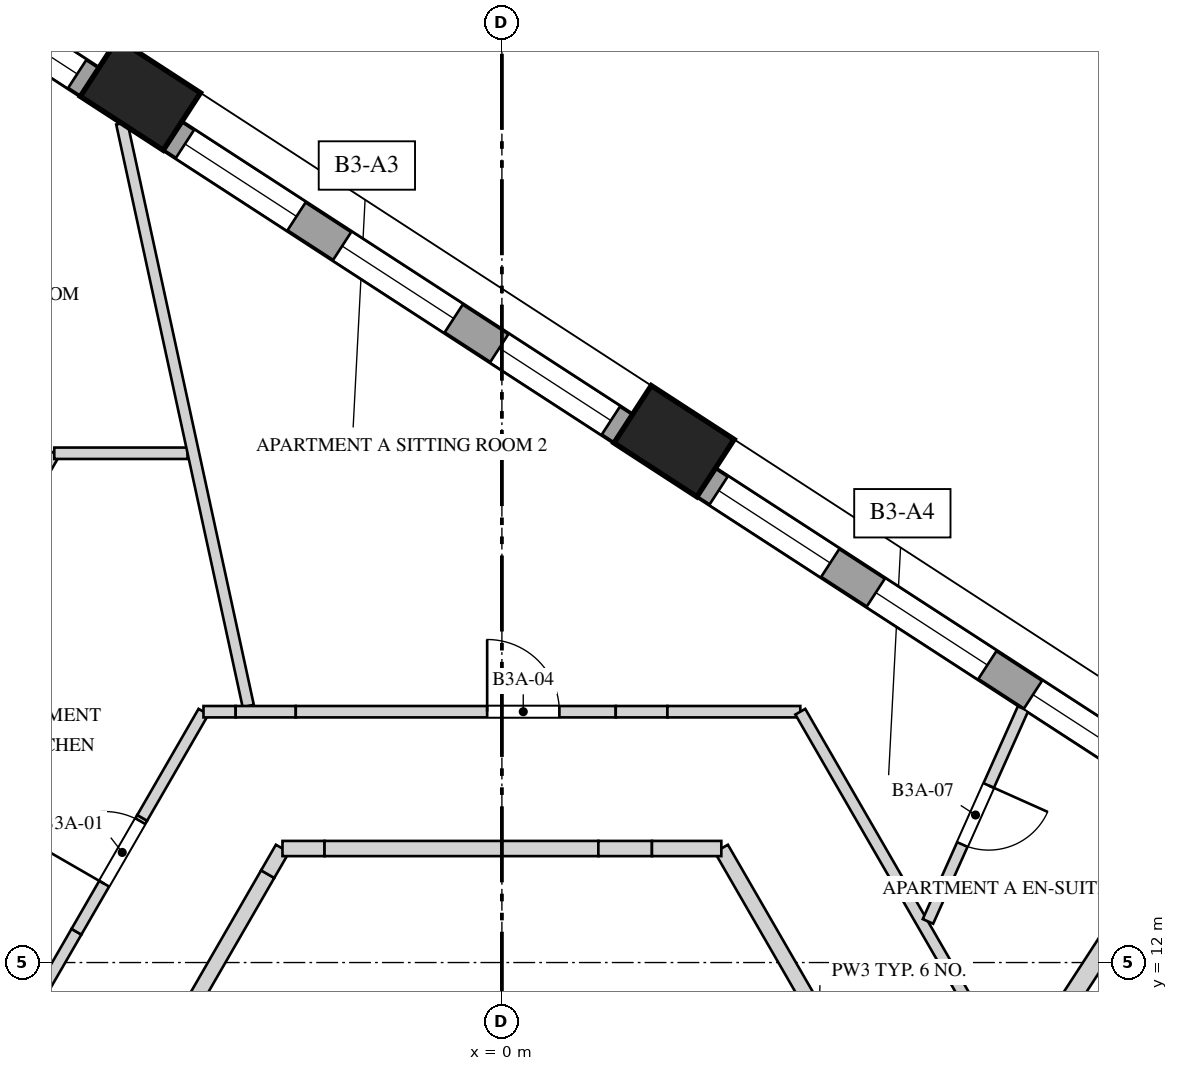
"""IFC4 building model, lengths in metres.
Left out: names, types, materials, properties, quantities, classifications, styles, units other than length and angle.
Written with IfcOpenShell. Run it as: python <this file> out.ifc"""

import sys

from ifc_helpers import new_model, si_unit, direction, frame, frame_2d, origin, origin_2d, place, context, subcontext, project, spatial, polyline, rectangle, outline, extrude, element, fill, save


model = new_model("IFC4")
c1 = context("Model", 3, precision=1e-05, world=origin(), true_north=direction((0.0, 1.0)))
c2 = subcontext(c1, "Body", "Model", "MODEL_VIEW")
j1 = project(units=[si_unit("LENGTHUNIT", "METRE"), si_unit("PLANEANGLEUNIT", "RADIAN")], contexts=[c1])
p1 = place(None, origin())
s1 = spatial("IfcSite", under=j1, at=p1, CompositionType="ELEMENT")
p2 = place(p1, origin())
s2 = spatial("IfcBuilding", under=s1, at=p2, CompositionType="ELEMENT")
p3 = place(p2, frame((0.0, 0.0, 133.6)))
s3 = spatial("IfcBuildingStorey", under=s2, at=p3, CompositionType="ELEMENT", Elevation=133.6)
for number, where, z_axis, x_axis in (
    (1, (2.265, 18.859, 0.0), (0.0, 0.0, 1.0), (-0.839, 0.545, 0.0)),
    (2, (-4.756, 23.418, 0.0), (0.0, 0.0, 1.0), (-0.839, 0.545, 0.0)),
):
    element("IfcColumn", number, at=place(p3, frame(where, z_axis=z_axis, x_axis=x_axis)), inside=s3, PredefinedType="COLUMN", context=c2, shape_type="SweptSolid", body=[
        extrude(rectangle(XDim=1.3, YDim=0.9, at=origin_2d()), origin(), (0.0, 0.0, 1.0), 4.0),
    ])
p4 = place(p3, frame((8.618, 14.465, 0.0), z_axis=(0.0, 0.0, 1.0), x_axis=(-0.838661251934, 0.544653380146, 0.0)))
e3 = element("IfcWall", 3, at=p4, inside=s3, PredefinedType="SOLIDWALL", context=c2, shape_type="SweptSolid", body=[
    extrude(rectangle(XDim=7.072, YDim=0.45, at=frame_2d((3.536, 0.0))), origin(), (0.0, 0.0, 1.0), 3.3),
])
p5 = place(p4, frame((0.195, 0.0, 0.5)))
e4 = element("IfcOpeningElement", 4, at=p5, cuts=e3, PredefinedType="OPENING", context=c2, shape_type="SweptSolid", body=[
    extrude(rectangle(XDim=1.75, YDim=2.65, at=frame_2d((0.875, 1.325))), frame((0.0, 0.235, 0.0), z_axis=(0.0, -1.0, 0.0), x_axis=(1.0, 0.0, 0.0)), (0.0, 0.0, 1.0), 0.47),
])
p6 = place(p4, frame((2.661, 0.0, 0.5)))
e5 = element("IfcOpeningElement", 5, at=p6, cuts=e3, PredefinedType="OPENING", context=c2, shape_type="SweptSolid", body=[
    extrude(rectangle(XDim=1.75, YDim=2.65, at=frame_2d((0.875, 1.325))), frame((0.0, 0.235, 0.0), z_axis=(0.0, -1.0, 0.0), x_axis=(1.0, 0.0, 0.0)), (0.0, 0.0, 1.0), 0.47),
])
p7 = place(p4, frame((5.126, 0.0, 0.5)))
e6 = element("IfcOpeningElement", 6, at=p7, cuts=e3, PredefinedType="OPENING", context=c2, shape_type="SweptSolid", body=[
    extrude(rectangle(XDim=1.75, YDim=2.65, at=frame_2d((0.875, 1.325))), frame((0.0, 0.235, 0.0), z_axis=(0.0, -1.0, 0.0), x_axis=(1.0, 0.0, 0.0)), (0.0, 0.0, 1.0), 0.47),
])
p8 = place(p3, frame((1.597, 19.024, 0.0), z_axis=(0.0, 0.0, 1.0), x_axis=(-0.838677021821, 0.54462909679, 0.0)))
e7 = element("IfcWall", 7, at=p8, inside=s3, PredefinedType="SOLIDWALL", context=c2, shape_type="SweptSolid", body=[
    extrude(rectangle(XDim=7.072, YDim=0.45, at=frame_2d((3.536, 0.0))), origin(), (0.0, 0.0, 1.0), 3.3),
])
p9 = place(p8, frame((0.195, 0.0, 0.5)))
e8 = element("IfcOpeningElement", 8, at=p9, cuts=e7, PredefinedType="OPENING", context=c2, shape_type="SweptSolid", body=[
    extrude(rectangle(XDim=1.75, YDim=2.65, at=frame_2d((0.875, 1.325))), frame((0.0, 0.235, 0.0), z_axis=(0.0, -1.0, 0.0), x_axis=(1.0, 0.0, 0.0)), (0.0, 0.0, 1.0), 0.47),
])
p10 = place(p8, frame((2.661, 0.0, 0.5)))
e9 = element("IfcOpeningElement", 9, at=p10, cuts=e7, PredefinedType="OPENING", context=c2, shape_type="SweptSolid", body=[
    extrude(rectangle(XDim=1.75, YDim=2.65, at=frame_2d((0.875, 1.325))), frame((0.0, 0.235, 0.0), z_axis=(0.0, -1.0, 0.0), x_axis=(1.0, 0.0, 0.0)), (0.0, 0.0, 1.0), 0.47),
])
p11 = place(p8, frame((5.126, 0.0, 0.5)))
e10 = element("IfcOpeningElement", 10, at=p11, cuts=e7, PredefinedType="OPENING", context=c2, shape_type="SweptSolid", body=[
    extrude(rectangle(XDim=1.75, YDim=2.0, at=frame_2d((0.875, 1.0))), frame((0.0, 0.235, 0.0), z_axis=(0.0, -1.0, 0.0), x_axis=(1.0, 0.0, 0.0)), (0.0, 0.0, 1.0), 0.47),
])
p12 = place(p3, frame((-5.424, 23.584, 0.0), z_axis=(0.0, 0.0, 1.0), x_axis=(-0.838675466927, 0.544631491171, 0.0)))
e11 = element("IfcWall", 11, at=p12, inside=s3, PredefinedType="SOLIDWALL", context=c2, shape_type="SweptSolid", body=[
    extrude(rectangle(XDim=6.421, YDim=0.45, at=frame_2d((3.211, 0.0))), origin(), (0.0, 0.0, 1.0), 3.3),
])
p13 = place(p12, frame((0.195, 0.0, 0.5)))
e12 = element("IfcOpeningElement", 12, at=p13, cuts=e11, PredefinedType="OPENING", context=c2, shape_type="SweptSolid", body=[
    extrude(rectangle(XDim=1.75, YDim=2.65, at=frame_2d((0.875, 1.325))), frame((0.0, 0.235, 0.0), z_axis=(0.0, -1.0, 0.0), x_axis=(1.0, 0.0, 0.0)), (0.0, 0.0, 1.0), 0.47),
])
p14 = place(p12, frame((2.661, 0.0, 0.5)))
e13 = element("IfcOpeningElement", 13, at=p14, cuts=e11, PredefinedType="OPENING", context=c2, shape_type="SweptSolid", body=[
    extrude(rectangle(XDim=1.75, YDim=2.65, at=frame_2d((0.875, 1.325))), frame((0.0, 0.235, 0.0), z_axis=(0.0, -1.0, 0.0), x_axis=(1.0, 0.0, 0.0)), (0.0, 0.0, 1.0), 0.47),
])
p15 = place(p12, frame((5.126, 0.0, 0.5)))
e14 = element("IfcOpeningElement", 14, at=p15, cuts=e11, PredefinedType="OPENING", context=c2, shape_type="SweptSolid", body=[
    extrude(rectangle(XDim=1.1, YDim=2.0, at=frame_2d((0.55, 1.0))), frame((0.0, 0.235, 0.0), z_axis=(0.0, -1.0, 0.0), x_axis=(1.0, 0.0, 0.0)), (0.0, 0.0, 1.0), 0.47),
])
p16 = place(p3, frame((-6.683, 17.325, 0.0), z_axis=(0.0, 0.0, 1.0), x_axis=(0.500108487576, 0.865962759392, 0.0)))
e15 = element("IfcWall", 15, at=p16, inside=s3, PredefinedType="PARTITIONING", context=c2, shape_type="SweptSolid", body=[
    extrude(rectangle(XDim=1.588, YDim=0.15, at=frame_2d((0.794, 0.0))), origin(), (0.0, 0.0, 1.0), 3.65),
])
p17 = place(p3, frame((-6.064, 11.597, 0.0), z_axis=(0.0, 0.0, 1.0), x_axis=(0.499797962495, 0.866142018774, 0.0)))
e16 = element("IfcWall", 16, at=p17, inside=s3, PredefinedType="PARTITIONING", context=c2, shape_type="SweptSolid", body=[
    extrude(rectangle(XDim=0.933, YDim=0.15, at=frame_2d((0.467, 0.0))), origin(), (0.0, 0.0, 1.0), 3.65),
])
p18 = place(p3, frame((-5.597, 12.405, 0.0), z_axis=(0.0, 0.0, 1.0), x_axis=(0.500040090343, 0.866002256377, 0.0)))
e17 = element("IfcWall", 17, at=p18, inside=s3, PredefinedType="PARTITIONING", context=c2, shape_type="SweptSolid", body=[
    extrude(outline(polyline([(0.0, 0.0), (1.73, 0.0), (1.73, 3.65), (1.104, 3.65), (1.104, 2.55), (0.0, 2.55), (0.0, 0.0)])), frame((0.0, 0.075, 0.0), z_axis=(0.0, -1.0, 0.0), x_axis=(1.0, 0.0, 0.0)), (0.0, 0.0, 1.0), 0.15),
])
p19 = place(p18, frame((0.73, 0.0, 0.0)))
e18 = element("IfcOpeningElement", 18, at=p19, cuts=e17, PredefinedType="OPENING", context=c2, shape_type="SweptSolid", body=[
    extrude(rectangle(XDim=0.95, YDim=2.4, at=frame_2d((0.475, 1.2))), frame((0.0, 0.085, 0.0), z_axis=(0.0, -1.0, 0.0), x_axis=(1.0, 0.0, 0.0)), (0.0, 0.0, 1.0), 0.17),
])
p20 = place(p3, frame((-4.732, 13.903, 0.0), z_axis=(0.0, 0.0, 1.0), x_axis=(0.499997628298, 0.866026773083, 0.0)))
e19 = element("IfcWall", 19, at=p20, inside=s3, PredefinedType="PARTITIONING", context=c2, shape_type="SweptSolid", body=[
    extrude(rectangle(XDim=1.613, YDim=0.15, at=frame_2d((0.806, 0.0))), origin(), (0.0, 0.0, 1.0), 3.65),
])
p21 = place(p3, frame((-5.889, 18.7, 0.0), z_axis=(0.0, 0.0, 1.0), x_axis=(1.0, 0.0, 0.0)))
e20 = element("IfcWall", 20, at=p21, inside=s3, PredefinedType="PARTITIONING", context=c2, shape_type="SweptSolid", body=[
    extrude(rectangle(XDim=1.753, YDim=0.15, at=frame_2d((0.877, 0.0))), origin(), (0.0, 0.0, 1.0), 3.65),
])
p22 = place(p3, frame((-5.001, 23.041, 0.0), z_axis=(0.0, 0.0, 1.0), x_axis=(0.212100148987, -0.977247935173, 0.0)))
e21 = element("IfcWall", 21, at=p22, inside=s3, PredefinedType="PARTITIONING", context=c2, shape_type="SweptSolid", body=[
    extrude(rectangle(XDim=7.844, YDim=0.15, at=frame_2d((3.922, 0.0))), origin(), (0.0, 0.0, 1.0), 2.75),
])
p23 = place(p3, frame((-3.926, 15.3, 0.0), z_axis=(0.0, 0.0, 1.0), x_axis=(1.0, 0.0, 0.0)))
e22 = element("IfcWall", 22, at=p23, inside=s3, PredefinedType="PARTITIONING", context=c2, shape_type="SweptSolid", body=[
    extrude(rectangle(XDim=0.423, YDim=0.15, at=frame_2d((0.212, 0.0))), origin(), (0.0, 0.0, 1.0), 3.65),
])
p24 = place(p3, frame((-3.503, 15.3, 0.0), z_axis=(0.0, 0.0, 1.0), x_axis=(1.0, 0.0, 0.0)))
e23 = element("IfcWall", 23, at=p24, inside=s3, PredefinedType="PARTITIONING", context=c2, shape_type="SweptSolid", body=[
    extrude(rectangle(XDim=0.791, YDim=0.15, at=frame_2d((0.396, 0.0))), origin(), (0.0, 0.0, 1.0), 2.75),
])
p25 = place(p3, frame((-2.712, 15.3, 0.0), z_axis=(0.0, 0.0, 1.0), x_axis=(1.0, 0.0, 0.0)))
e24 = element("IfcWall", 24, at=p25, inside=s3, PredefinedType="PARTITIONING", context=c2, shape_type="SweptSolid", body=[
    extrude(rectangle(XDim=4.209, YDim=0.15, at=frame_2d((2.105, 0.0))), origin(), (0.0, 0.0, 1.0), 3.65),
])
p26 = place(p25, frame((2.518, 0.0, 0.0)))
e25 = element("IfcOpeningElement", 25, at=p26, cuts=e24, PredefinedType="OPENING", context=c2, shape_type="SweptSolid", body=[
    extrude(rectangle(XDim=0.95, YDim=2.4, at=frame_2d((0.475, 1.2))), frame((0.0, 0.085, 0.0), z_axis=(0.0, -1.0, 0.0), x_axis=(1.0, 0.0, 0.0)), (0.0, 0.0, 1.0), 0.17),
])
p27 = place(p3, frame((1.498, 15.3, 0.0), z_axis=(0.0, 0.0, 1.0), x_axis=(1.0, 0.0, 0.0)))
e26 = element("IfcWall", 26, at=p27, inside=s3, PredefinedType="PARTITIONING", context=c2, shape_type="SweptSolid", body=[
    extrude(rectangle(XDim=0.68, YDim=0.15, at=frame_2d((0.34, 0.0))), origin(), (0.0, 0.0, 1.0), 2.95),
])
p28 = place(p3, frame((2.177, 15.3, 0.0), z_axis=(0.0, 0.0, 1.0), x_axis=(1.0, 0.0, 0.0)))
e27 = element("IfcWall", 27, at=p28, inside=s3, PredefinedType="PARTITIONING", context=c2, shape_type="SweptSolid", body=[
    extrude(rectangle(XDim=1.749, YDim=0.15, at=frame_2d((0.874, 0.0))), origin(), (0.0, 0.0, 1.0), 3.65),
])
p29 = place(p3, frame((3.926, 15.3, 0.0), z_axis=(0.0, 0.0, 1.0), x_axis=(0.499974706519, -0.86604000649, 0.0)))
e28 = element("IfcWall", 28, at=p29, inside=s3, PredefinedType="PARTITIONING", context=c2, shape_type="SweptSolid", body=[
    extrude(rectangle(XDim=5.278, YDim=0.15, at=frame_2d((2.639, 0.0))), origin(), (0.0, 0.0, 1.0), 3.65),
])
p30 = place(p3, frame((6.856, 15.341, 0.0), z_axis=(0.0, 0.0, 1.0), x_axis=(-0.408065741822, -0.912952545509, 0.0)))
e29 = element("IfcWall", 29, at=p30, inside=s3, PredefinedType="PARTITIONING", context=c2, shape_type="SweptSolid", body=[
    extrude(rectangle(XDim=3.066, YDim=0.15, at=frame_2d((1.533, 0.0))), origin(), (0.0, 0.0, 1.0), 3.65),
])
p31 = place(p30, frame((1.108, 0.0, 0.0)))
e30 = element("IfcOpeningElement", 30, at=p31, cuts=e29, PredefinedType="OPENING", context=c2, shape_type="SweptSolid", body=[
    extrude(rectangle(XDim=0.85, YDim=2.4, at=frame_2d((0.425, 1.2))), frame((0.0, 0.085, 0.0), z_axis=(0.0, -1.0, 0.0), x_axis=(1.0, 0.0, 0.0)), (0.0, 0.0, 1.0), 0.17),
])
p32 = place(p3, frame((9.041, 13.922, 0.0), z_axis=(0.0, 0.0, 1.0), x_axis=(-0.544639775338, -0.838670087174, 0.0)))
e31 = element("IfcWall", 31, at=p32, inside=s3, PredefinedType="SOLIDWALL", context=c2, shape_type="SweptSolid", body=[
    extrude(rectangle(XDim=6.106, YDim=0.25, at=frame_2d((3.053, 0.0))), origin(), (0.0, 0.0, 1.0), 2.95),
])
p33 = place(p3, frame((2.887, 13.5, 0.0), z_axis=(0.0, 0.0, 1.0), x_axis=(0.50000466804, -0.866022708674, 0.0)))
e32 = element("IfcWall", 32, at=p33, inside=s3, PredefinedType="SOLIDWALL", context=c2, shape_type="SweptSolid", body=[
    extrude(rectangle(XDim=5.142, YDim=0.2, at=frame_2d((2.571, 0.0))), origin(), (0.0, 0.0, 1.0), 3.65),
])
p34 = place(p3, frame((-4.171, 11.276, 0.0), z_axis=(0.0, 0.0, 1.0), x_axis=(0.50001992892, 0.866013897511, 0.0)))
e33 = element("IfcWall", 33, at=p34, inside=s3, PredefinedType="SOLIDWALL", context=c2, shape_type="SweptSolid", body=[
    extrude(rectangle(XDim=2.179, YDim=0.2, at=frame_2d((1.089, 0.0))), origin(), (0.0, 0.0, 1.0), 3.65),
])
p35 = place(p3, frame((-3.081, 13.163, 0.0), z_axis=(0.0, 0.0, 1.0), x_axis=(0.499849133735, 0.866112488944, 0.0)))
e34 = element("IfcWall", 34, at=p35, inside=s3, PredefinedType="SOLIDWALL", context=c2, shape_type="SweptSolid", body=[
    extrude(rectangle(XDim=0.389, YDim=0.2, at=frame_2d((0.195, 0.0))), origin(), (0.0, 0.0, 1.0), 2.75),
])
p36 = place(p3, frame((-2.887, 13.5, 0.0), z_axis=(0.0, 0.0, 1.0), x_axis=(1.0, 0.0, 0.0)))
e35 = element("IfcWall", 35, at=p36, inside=s3, PredefinedType="SOLIDWALL", context=c2, shape_type="SweptSolid", body=[
    extrude(rectangle(XDim=0.553, YDim=0.2, at=frame_2d((0.277, 0.0))), origin(), (0.0, 0.0, 1.0), 2.75),
])
p37 = place(p3, frame((-2.333, 13.5, 0.0), z_axis=(0.0, 0.0, 1.0), x_axis=(1.0, 0.0, 0.0)))
e36 = element("IfcWall", 36, at=p37, inside=s3, PredefinedType="SOLIDWALL", context=c2, shape_type="SweptSolid", body=[
    extrude(rectangle(XDim=3.603, YDim=0.2, at=frame_2d((1.801, 0.0))), origin(), (0.0, 0.0, 1.0), 3.65),
])
p38 = place(p3, frame((1.269, 13.5, 0.0), z_axis=(0.0, 0.0, 1.0), x_axis=(1.0, 0.0, 0.0)))
e37 = element("IfcWall", 37, at=p38, inside=s3, PredefinedType="SOLIDWALL", context=c2, shape_type="SweptSolid", body=[
    extrude(rectangle(XDim=0.705, YDim=0.2, at=frame_2d((0.353, 0.0))), origin(), (0.0, 0.0, 1.0), 2.95),
])
p39 = place(p3, frame((1.974, 13.5, 0.0), z_axis=(0.0, 0.0, 1.0), x_axis=(1.0, 0.0, 0.0)))
e38 = element("IfcWall", 38, at=p39, inside=s3, PredefinedType="SOLIDWALL", context=c2, shape_type="SweptSolid", body=[
    extrude(rectangle(XDim=0.913, YDim=0.2, at=frame_2d((0.457, 0.0))), origin(), (0.0, 0.0, 1.0), 3.65),
])
p40 = place(p5, origin())
e39 = element("IfcWindow", 39, at=p40, inside=s3, PartitioningType="SINGLE_PANEL", PredefinedType="WINDOW", context=c2, shape_type="SweptSolid", body=[
    extrude(rectangle(XDim=1.75, YDim=2.65, at=frame_2d((0.875, 1.325))), frame((0.0, 0.03, 0.0), z_axis=(0.0, -1.0, 0.0), x_axis=(1.0, 0.0, 0.0)), (0.0, 0.0, 1.0), 0.06),
])
fill(e4, e39)
p41 = place(p6, origin())
e40 = element("IfcWindow", 40, at=p41, inside=s3, PartitioningType="SINGLE_PANEL", PredefinedType="WINDOW", context=c2, shape_type="SweptSolid", body=[
    extrude(rectangle(XDim=1.75, YDim=2.65, at=frame_2d((0.875, 1.325))), frame((0.0, 0.03, 0.0), z_axis=(0.0, -1.0, 0.0), x_axis=(1.0, 0.0, 0.0)), (0.0, 0.0, 1.0), 0.06),
])
fill(e5, e40)
p42 = place(p7, origin())
e41 = element("IfcWindow", 41, at=p42, inside=s3, PartitioningType="SINGLE_PANEL", PredefinedType="WINDOW", context=c2, shape_type="SweptSolid", body=[
    extrude(rectangle(XDim=1.75, YDim=2.65, at=frame_2d((0.875, 1.325))), frame((0.0, 0.03, 0.0), z_axis=(0.0, -1.0, 0.0), x_axis=(1.0, 0.0, 0.0)), (0.0, 0.0, 1.0), 0.06),
])
fill(e6, e41)
p43 = place(p9, origin())
e42 = element("IfcWindow", 42, at=p43, inside=s3, PartitioningType="SINGLE_PANEL", PredefinedType="WINDOW", context=c2, shape_type="SweptSolid", body=[
    extrude(rectangle(XDim=1.75, YDim=2.65, at=frame_2d((0.875, 1.325))), frame((0.0, 0.03, 0.0), z_axis=(0.0, -1.0, 0.0), x_axis=(1.0, 0.0, 0.0)), (0.0, 0.0, 1.0), 0.06),
])
fill(e8, e42)
p44 = place(p10, origin())
e43 = element("IfcWindow", 43, at=p44, inside=s3, PartitioningType="SINGLE_PANEL", PredefinedType="WINDOW", context=c2, shape_type="SweptSolid", body=[
    extrude(rectangle(XDim=1.75, YDim=2.65, at=frame_2d((0.875, 1.325))), frame((0.0, 0.03, 0.0), z_axis=(0.0, -1.0, 0.0), x_axis=(1.0, 0.0, 0.0)), (0.0, 0.0, 1.0), 0.06),
])
fill(e9, e43)
p45 = place(p11, origin())
e44 = element("IfcWindow", 44, at=p45, inside=s3, PartitioningType="SINGLE_PANEL", PredefinedType="WINDOW", context=c2, shape_type="SweptSolid", body=[
    extrude(rectangle(XDim=1.75, YDim=2.0, at=frame_2d((0.875, 1.0))), frame((0.0, 0.03, 0.0), z_axis=(0.0, -1.0, 0.0), x_axis=(1.0, 0.0, 0.0)), (0.0, 0.0, 1.0), 0.06),
])
fill(e10, e44)
p46 = place(p13, origin())
e45 = element("IfcWindow", 45, at=p46, inside=s3, PartitioningType="SINGLE_PANEL", PredefinedType="WINDOW", context=c2, shape_type="SweptSolid", body=[
    extrude(rectangle(XDim=1.75, YDim=2.65, at=frame_2d((0.875, 1.325))), frame((0.0, 0.03, 0.0), z_axis=(0.0, -1.0, 0.0), x_axis=(1.0, 0.0, 0.0)), (0.0, 0.0, 1.0), 0.06),
])
fill(e12, e45)
p47 = place(p19, origin())
e46 = element("IfcDoor", 46, at=p47, inside=s3, OperationType="SINGLE_SWING_LEFT", PredefinedType="DOOR", context=c2, shape_type="SweptSolid", body=[
    extrude(rectangle(XDim=0.95, YDim=2.4, at=frame_2d((0.475, 1.2))), frame((0.0, 0.025, 0.0), z_axis=(0.0, -1.0, 0.0), x_axis=(1.0, 0.0, 0.0)), (0.0, 0.0, 1.0), 0.05),
])
fill(e18, e46)
p48 = place(p26, origin())
e47 = element("IfcDoor", 47, at=p48, inside=s3, OperationType="SINGLE_SWING_RIGHT", PredefinedType="DOOR", context=c2, shape_type="SweptSolid", body=[
    extrude(rectangle(XDim=0.95, YDim=2.4, at=frame_2d((0.475, 1.2))), frame((0.0, 0.025, 0.0), z_axis=(0.0, -1.0, 0.0), x_axis=(1.0, 0.0, 0.0)), (0.0, 0.0, 1.0), 0.05),
])
fill(e25, e47)
p49 = place(p31, origin())
e48 = element("IfcDoor", 48, at=p49, inside=s3, OperationType="SINGLE_SWING_LEFT", PredefinedType="DOOR", context=c2, shape_type="SweptSolid", body=[
    extrude(rectangle(XDim=0.85, YDim=2.4, at=frame_2d((0.425, 1.2))), frame((0.0, 0.025, 0.0), z_axis=(0.0, -1.0, 0.0), x_axis=(1.0, 0.0, 0.0)), (0.0, 0.0, 1.0), 0.05),
])
fill(e30, e48)
save(model, sys.argv[1])
